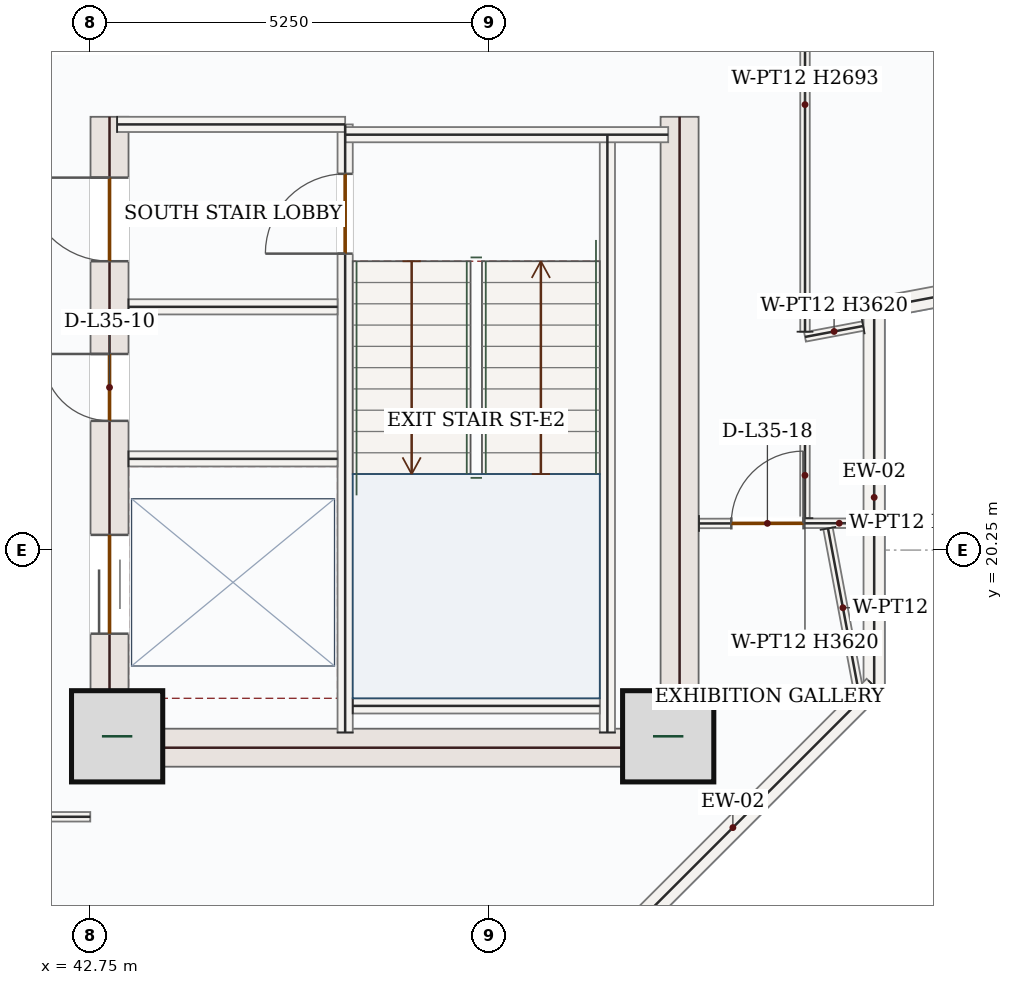
"""IFC4 building model, lengths in metres.
Left out: names, types, materials, properties, quantities, classifications, styles, units other than length and angle.
Written with IfcOpenShell. Run it as: python <this file> out.ifc"""

import sys

from ifc_helpers import new_model, si_unit, direction, frame, frame_2d, origin, origin_2d, place, context, subcontext, project, spatial, rectangle, extrude, source, transform, mapped, element, fill, save


model = new_model("IFC4")
c1 = context("Model", 3, precision=1e-05, world=origin(), true_north=direction((0.0, 1.0)))
c2 = subcontext(c1, "Body", "Model", "MODEL_VIEW")
j1 = project(units=[si_unit("LENGTHUNIT", "METRE"), si_unit("PLANEANGLEUNIT", "RADIAN")], contexts=[c1])
p1 = place(None, origin())
s1 = spatial("IfcSite", under=j1, at=p1, CompositionType="ELEMENT")
p2 = place(p1, origin())
s2 = spatial("IfcBuilding", under=s1, at=p2, CompositionType="ELEMENT")
p3 = place(p2, frame((0.0, 0.0, 155.1)))
s3 = spatial("IfcBuildingStorey", under=s2, at=p3, CompositionType="ELEMENT", Elevation=155.1)
p4 = place(p3, frame((43.0, 17.4, 0.0), z_axis=(0.0, 0.0, 1.0), x_axis=(0.0, 1.0, 0.0)))
e1 = element("IfcWall", 1, at=p4, inside=s3, PredefinedType="SHEAR", context=c2, shape_type="SweptSolid", body=[
    extrude(rectangle(XDim=8.55, YDim=0.5, at=frame_2d((4.275, 0.0))), origin(), (0.0, 0.0, 1.0), 3.62),
])
p5 = place(p4, frame((6.65, 0.0, 0.0)))
e2 = element("IfcOpeningElement", 2, at=p5, cuts=e1, PredefinedType="OPENING", context=c2, shape_type="SweptSolid", body=[
    extrude(rectangle(XDim=1.1, YDim=2.2, at=frame_2d((0.55, 1.1))), frame((0.0, 0.26, 0.0), z_axis=(0.0, -1.0, 0.0), x_axis=(1.0, 0.0, 0.0)), (0.0, 0.0, 1.0), 0.52),
])
p6 = place(p4, frame((1.75, 0.0, 0.0)))
e3 = element("IfcOpeningElement", 3, at=p6, cuts=e1, PredefinedType="OPENING", context=c2, shape_type="SweptSolid", body=[
    extrude(rectangle(XDim=1.3, YDim=2.2, at=frame_2d((0.65, 1.1))), frame((0.0, 0.26, 0.0), z_axis=(0.0, -1.0, 0.0), x_axis=(1.0, 0.0, 0.0)), (0.0, 0.0, 1.0), 0.52),
])
p7 = place(p4, frame((4.55, 0.0, 0.0)))
e4 = element("IfcOpeningElement", 4, at=p7, cuts=e1, PredefinedType="OPENING", context=c2, shape_type="SweptSolid", body=[
    extrude(rectangle(XDim=0.88, YDim=2.1, at=frame_2d((0.44, 1.05))), frame((0.0, 0.26, 0.0), z_axis=(0.0, -1.0, 0.0), x_axis=(1.0, 0.0, 0.0)), (0.0, 0.0, 1.0), 0.52),
])
m1 = source(origin(), c2, "Body", "SweptSolid", [
    extrude(rectangle(XDim=8.55, YDim=0.5, at=frame_2d((4.275, 0.0))), origin(), (0.0, 0.0, 1.0), 3.62),
])
p8 = place(p3, frame((50.5, 17.4, 0.0), z_axis=(0.0, 0.0, 1.0), x_axis=(0.0, 1.0, 0.0)))
e5 = element("IfcWall", 5, at=p8, inside=s3, PredefinedType="SHEAR", context=c2, shape_type="MappedRepresentation", body=[
    mapped(m1, transform((0.0, 0.0, 0.0), x_axis=(1.0, 0.0, 0.0), y_axis=(0.0, 1.0, 0.0), z_axis=(0.0, 0.0, 1.0), scale=1.0)),
])
m2 = source(origin(), c2, "Body", "SweptSolid", [
    extrude(rectangle(XDim=7.0, YDim=0.5, at=frame_2d((3.5, 0.0))), origin(), (0.0, 0.0, 1.0), 3.62),
])
p9 = place(p3, frame((43.25, 17.65, 0.0), z_axis=(0.0, 0.0, 1.0), x_axis=(1.0, 0.0, 0.0)))
e6 = element("IfcWall", 6, at=p9, inside=s3, PredefinedType="SHEAR", context=c2, shape_type="MappedRepresentation", body=[
    mapped(m2, transform((0.0, 0.0, 0.0), x_axis=(1.0, 0.0, 0.0), y_axis=(0.0, 1.0, 0.0), z_axis=(0.0, 0.0, 1.0), scale=1.0)),
])
m3 = source(origin(), c2, "Body", "SweptSolid", [
    extrude(rectangle(XDim=1.2, YDim=1.2, at=origin_2d()), origin(), (0.0, 0.0, 1.0), 3.9),
])
for number, where, z_axis, x_axis in (
    (7, (43.1, 17.8, 0.0), (0.0, 0.0, 1.0), (1.0, 0.0, 0.0)),
    (8, (50.35, 17.8, 0.0), (0.0, 0.0, 1.0), (1.0, 0.0, 0.0)),
):
    element("IfcColumn", number, at=place(p3, frame(where, z_axis=z_axis, x_axis=x_axis)), inside=s3, PredefinedType="COLUMN", context=c2, shape_type="MappedRepresentation", body=[
        mapped(m3, transform((0.0, 0.0, 0.0), x_axis=(1.0, 0.0, 0.0), y_axis=(0.0, 1.0, 0.0), z_axis=(0.0, 0.0, 1.0), scale=1.0)),
    ])
p10 = place(p3, frame((61.957, 25.1, 0.0), z_axis=(0.0, 0.0, 1.0), x_axis=(-0.982808012228, -0.184630471755, 0.0)))
e9 = element("IfcWall", 9, at=p10, inside=s3, PredefinedType="SOLIDWALL", context=c2, shape_type="SweptSolid", body=[
    extrude(rectangle(XDim=9.052, YDim=0.28, at=frame_2d((4.526, 0.0))), origin(), (0.0, 0.0, 1.0), 3.62),
])
p11 = place(p10, frame((3.626, 0.0, 0.85)))
e10 = element("IfcOpeningElement", 10, at=p11, cuts=e9, PredefinedType="OPENING", context=c2, shape_type="SweptSolid", body=[
    extrude(rectangle(XDim=1.8, YDim=1.75, at=frame_2d((0.9, 0.875))), frame((0.0, 0.15, 0.0), z_axis=(0.0, -1.0, 0.0), x_axis=(1.0, 0.0, 0.0)), (0.0, 0.0, 1.0), 0.3),
])
m4 = source(origin(), c2, "Body", "SweptSolid", [
    extrude(rectangle(XDim=4.97, YDim=0.28, at=frame_2d((2.485, 0.0))), origin(), (0.0, 0.0, 1.0), 3.62),
])
p12 = place(p3, frame((53.06, 23.428, 0.0), z_axis=(0.0, 0.0, 1.0), x_axis=(0.0, -1.0, 0.0)))
e11 = element("IfcWall", 11, at=p12, inside=s3, PredefinedType="SOLIDWALL", context=c2, shape_type="MappedRepresentation", body=[
    mapped(m4, transform((0.0, 0.0, 0.0), x_axis=(1.0, 0.0, 0.0), y_axis=(0.0, 1.0, 0.0), z_axis=(0.0, 0.0, 1.0), scale=1.0)),
])
m5 = source(origin(), c2, "Body", "SweptSolid", [
    extrude(rectangle(XDim=5.258, YDim=0.28, at=frame_2d((2.629, 0.0))), origin(), (0.0, 0.0, 1.0), 3.62),
])
p13 = place(p3, frame((53.06, 18.458, 0.0), z_axis=(0.0, 0.0, 1.0), x_axis=(-0.707106781187, -0.707106781187, 0.0)))
e12 = element("IfcWall", 12, at=p13, inside=s3, PredefinedType="SOLIDWALL", context=c2, shape_type="MappedRepresentation", body=[
    mapped(m5, transform((0.0, 0.0, 0.0), x_axis=(1.0, 0.0, 0.0), y_axis=(0.0, 1.0, 0.0), z_axis=(0.0, 0.0, 1.0), scale=1.0)),
])
m6 = source(origin(), c2, "Body", "SweptSolid", [
    extrude(rectangle(XDim=7.87, YDim=0.2, at=frame_2d((3.935, 0.0))), origin(), (0.0, 0.0, 1.0), 3.62),
])
p14 = place(p3, frame((49.55, 17.85, 0.0), z_axis=(0.0, 0.0, 1.0), x_axis=(0.0, 1.0, 0.0)))
e13 = element("IfcWall", 13, at=p14, inside=s3, PredefinedType="SOLIDWALL", context=c2, shape_type="MappedRepresentation", body=[
    mapped(m6, transform((0.0, 0.0, 0.0), x_axis=(1.0, 0.0, 0.0), y_axis=(0.0, 1.0, 0.0), z_axis=(0.0, 0.0, 1.0), scale=1.0)),
])
p15 = place(p3, frame((46.1, 17.85, 0.0), z_axis=(0.0, 0.0, 1.0), x_axis=(0.0, 1.0, 0.0)))
e14 = element("IfcWall", 14, at=p15, inside=s3, PredefinedType="SOLIDWALL", context=c2, shape_type="SweptSolid", body=[
    extrude(rectangle(XDim=8.0, YDim=0.2, at=frame_2d((4.0, 0.0))), origin(), (0.0, 0.0, 1.0), 3.62),
])
p16 = place(p15, frame((6.3, 0.0, 0.0)))
e15 = element("IfcOpeningElement", 15, at=p16, cuts=e14, PredefinedType="OPENING", context=c2, shape_type="SweptSolid", body=[
    extrude(rectangle(XDim=1.05, YDim=2.15, at=frame_2d((0.525, 1.075))), frame((0.0, 0.11, 0.0), z_axis=(0.0, -1.0, 0.0), x_axis=(1.0, 0.0, 0.0)), (0.0, 0.0, 1.0), 0.22),
])
m7 = source(origin(), c2, "Body", "SweptSolid", [
    extrude(rectangle(XDim=3.0, YDim=0.2, at=frame_2d((1.5, 0.0))), origin(), (0.0, 0.0, 1.0), 3.62),
])
p17 = place(p3, frame((43.1, 25.85, 0.0), z_axis=(0.0, 0.0, 1.0), x_axis=(1.0, 0.0, 0.0)))
e16 = element("IfcWall", 16, at=p17, inside=s3, PredefinedType="SOLIDWALL", context=c2, shape_type="MappedRepresentation", body=[
    mapped(m7, transform((0.0, 0.0, 0.0), x_axis=(1.0, 0.0, 0.0), y_axis=(0.0, 1.0, 0.0), z_axis=(0.0, 0.0, 1.0), scale=1.0)),
])
m8 = source(origin(), c2, "Body", "SweptSolid", [
    extrude(rectangle(XDim=4.25, YDim=0.2, at=frame_2d((2.125, 0.0))), origin(), (0.0, 0.0, 1.0), 3.62),
])
p18 = place(p3, frame((46.1, 25.715, 0.0), z_axis=(0.0, 0.0, 1.0), x_axis=(1.0, 0.0, 0.0)))
e17 = element("IfcWall", 17, at=p18, inside=s3, PredefinedType="SOLIDWALL", context=c2, shape_type="MappedRepresentation", body=[
    mapped(m8, transform((0.0, 0.0, 0.0), x_axis=(1.0, 0.0, 0.0), y_axis=(0.0, 1.0, 0.0), z_axis=(0.0, 0.0, 1.0), scale=1.0)),
])
m9 = source(origin(), c2, "Body", "SweptSolid", [
    extrude(rectangle(XDim=3.25, YDim=0.2, at=frame_2d((1.625, 0.0))), origin(), (0.0, 0.0, 1.0), 3.62),
])
p19 = place(p3, frame((46.2, 18.2, 0.0), z_axis=(0.0, 0.0, 1.0), x_axis=(1.0, 0.0, 0.0)))
e18 = element("IfcWall", 18, at=p19, inside=s3, PredefinedType="SOLIDWALL", context=c2, shape_type="MappedRepresentation", body=[
    mapped(m9, transform((0.0, 0.0, 0.0), x_axis=(1.0, 0.0, 0.0), y_axis=(0.0, 1.0, 0.0), z_axis=(0.0, 0.0, 1.0), scale=1.0)),
])
m10 = source(origin(), c2, "Body", "SweptSolid", [
    extrude(rectangle(XDim=2.75, YDim=0.2, at=frame_2d((1.375, 0.0))), origin(), (0.0, 0.0, 1.0), 3.62),
])
for number, where, z_axis, x_axis in (
    (19, (43.25, 23.45, 0.0), (0.0, 0.0, 1.0), (1.0, 0.0, 0.0)),
    (20, (43.25, 21.45, 0.0), (0.0, 0.0, 1.0), (1.0, 0.0, 0.0)),
):
    element("IfcWall", number, at=place(p3, frame(where, z_axis=z_axis, x_axis=x_axis)), inside=s3, PredefinedType="SOLIDWALL", context=c2, shape_type="MappedRepresentation", body=[
        mapped(m10, transform((0.0, 0.0, 0.0), x_axis=(1.0, 0.0, 0.0), y_axis=(0.0, 1.0, 0.0), z_axis=(0.0, 0.0, 1.0), scale=1.0)),
    ])
p20 = place(p3, frame((50.755, 20.6, 0.0), z_axis=(0.0, 0.0, 1.0), x_axis=(0.99999875384, 0.001578708001, 0.0)))
e21 = element("IfcWall", 21, at=p20, inside=s3, PredefinedType="PARTITIONING", context=c2, shape_type="SweptSolid", body=[
    extrude(rectangle(XDim=2.165, YDim=0.125, at=frame_2d((1.083, 0.0))), origin(), (0.0, 0.0, 1.0), 3.62),
])
p21 = place(p20, frame((0.425, 0.0, 0.0)))
e22 = element("IfcOpeningElement", 22, at=p21, cuts=e21, PredefinedType="OPENING", context=c2, shape_type="SweptSolid", body=[
    extrude(rectangle(XDim=0.95, YDim=2.15, at=frame_2d((0.475, 1.075))), frame((0.0, 0.073, 0.0), z_axis=(0.0, -1.0, 0.0), x_axis=(1.0, 0.0, 0.0)), (0.0, 0.0, 1.0), 0.145),
])
m11 = source(origin(), c2, "Body", "SweptSolid", [
    extrude(rectangle(XDim=1.127, YDim=0.125, at=frame_2d((0.563, 0.0))), origin(), (0.0, 0.0, 1.0), 3.62),
])
p22 = place(p3, frame((52.149, 20.67, 0.0), z_axis=(0.0, 0.0, 1.0), x_axis=(0.001083188273, 0.999999413351, 0.0)))
e23 = element("IfcWall", 23, at=p22, inside=s3, PredefinedType="PARTITIONING", context=c2, shape_type="MappedRepresentation", body=[
    mapped(m11, transform((0.0, 0.0, 0.0), x_axis=(1.0, 0.0, 0.0), y_axis=(0.0, 1.0, 0.0), z_axis=(0.0, 0.0, 1.0), scale=1.0)),
])
m12 = source(origin(), c2, "Body", "SweptSolid", [
    extrude(rectangle(XDim=2.124, YDim=0.125, at=frame_2d((1.062, 0.0))), origin(), (0.0, 0.0, 1.0), 3.62),
])
p23 = place(p3, frame((52.452, 20.535, 0.0), z_axis=(0.0, 0.0, 1.0), x_axis=(0.184697942122, -0.982795334836, 0.0)))
e24 = element("IfcWall", 24, at=p23, inside=s3, PredefinedType="PARTITIONING", context=c2, shape_type="MappedRepresentation", body=[
    mapped(m12, transform((0.0, 0.0, 0.0), x_axis=(1.0, 0.0, 0.0), y_axis=(0.0, 1.0, 0.0), z_axis=(0.0, 0.0, 1.0), scale=1.0)),
])
m13 = source(origin(), c2, "Body", "SweptSolid", [
    extrude(rectangle(XDim=0.779, YDim=0.125, at=frame_2d((0.389, 0.0))), origin(), (0.0, 0.0, 1.0), 3.62),
])
p24 = place(p3, frame((52.915, 23.198, 0.0), z_axis=(0.0, 0.0, 1.0), x_axis=(-0.982850878619, -0.184402143149, 0.0)))
e25 = element("IfcWall", 25, at=p24, inside=s3, PredefinedType="PARTITIONING", context=c2, shape_type="MappedRepresentation", body=[
    mapped(m13, transform((0.0, 0.0, 0.0), x_axis=(1.0, 0.0, 0.0), y_axis=(0.0, 1.0, 0.0), z_axis=(0.0, 0.0, 1.0), scale=1.0)),
])
m14 = source(origin(), c2, "Body", "SweptSolid", [
    extrude(rectangle(XDim=5.975, YDim=0.125, at=frame_2d((2.988, 0.0))), origin(), (0.0, 0.0, 1.0), 2.693),
])
p25 = place(p3, frame((52.15, 23.123, 0.0), z_axis=(0.0, 0.0, 1.0), x_axis=(0.0, 1.0, 0.0)))
e26 = element("IfcWall", 26, at=p25, inside=s3, PredefinedType="PARTITIONING", context=c2, shape_type="MappedRepresentation", body=[
    mapped(m14, transform((0.0, 0.0, 0.0), x_axis=(1.0, 0.0, 0.0), y_axis=(0.0, 1.0, 0.0), z_axis=(0.0, 0.0, 1.0), scale=1.0)),
])
m15 = source(origin(), c2, "Body", "SweptSolid", [
    extrude(rectangle(XDim=3.814, YDim=0.125, at=frame_2d((1.907, 0.0))), origin(), (0.0, 0.0, 1.0), 3.079),
])
p26 = place(p3, frame((38.932, 16.74, 0.0), z_axis=(0.0, 0.0, 1.0), x_axis=(0.999999948787, 0.000320040949, 0.0)))
e27 = element("IfcWall", 27, at=p26, inside=s3, PredefinedType="PARTITIONING", context=c2, shape_type="MappedRepresentation", body=[
    mapped(m15, transform((0.0, 0.0, 0.0), x_axis=(1.0, 0.0, 0.0), y_axis=(0.0, 1.0, 0.0), z_axis=(0.0, 0.0, 1.0), scale=1.0)),
])
m16 = source(origin(), c2, "Body", "SweptSolid", [
    extrude(rectangle(XDim=1.05, YDim=2.15, at=frame_2d((0.525, 1.075))), frame((0.0, 0.025, 0.0), z_axis=(0.0, -1.0, 0.0), x_axis=(1.0, 0.0, 0.0)), (0.0, 0.0, 1.0), 0.05),
])
p27 = place(p16, origin())
e28 = element("IfcDoor", 28, at=p27, inside=s3, OperationType="SINGLE_SWING_LEFT", PredefinedType="DOOR", context=c2, shape_type="MappedRepresentation", body=[
    mapped(m16, transform((0.0, 0.0, 0.0), x_axis=(1.0, 0.0, 0.0), y_axis=(0.0, 1.0, 0.0), z_axis=(0.0, 0.0, 1.0), scale=1.0)),
])
fill(e15, e28)
m17 = source(origin(), c2, "Body", "SweptSolid", [
    extrude(rectangle(XDim=1.1, YDim=2.2, at=frame_2d((0.55, 1.1))), frame((0.0, 0.025, 0.0), z_axis=(0.0, -1.0, 0.0), x_axis=(1.0, 0.0, 0.0)), (0.0, 0.0, 1.0), 0.05),
])
p28 = place(p5, origin())
e29 = element("IfcDoor", 29, at=p28, inside=s3, OperationType="SINGLE_SWING_RIGHT", PredefinedType="DOOR", context=c2, shape_type="MappedRepresentation", body=[
    mapped(m17, transform((0.0, 0.0, 0.0), x_axis=(1.0, 0.0, 0.0), y_axis=(0.0, 1.0, 0.0), z_axis=(0.0, 0.0, 1.0), scale=1.0)),
])
fill(e2, e29)
m18 = source(origin(), c2, "Body", "SweptSolid", [
    extrude(rectangle(XDim=1.3, YDim=2.2, at=frame_2d((0.65, 1.1))), frame((0.0, 0.025, 0.0), z_axis=(0.0, -1.0, 0.0), x_axis=(1.0, 0.0, 0.0)), (0.0, 0.0, 1.0), 0.05),
])
p29 = place(p6, origin())
e30 = element("IfcDoor", 30, at=p29, inside=s3, OperationType="DOUBLE_DOOR_SLIDING", PredefinedType="DOOR", context=c2, shape_type="MappedRepresentation", body=[
    mapped(m18, transform((0.0, 0.0, 0.0), x_axis=(1.0, 0.0, 0.0), y_axis=(0.0, 1.0, 0.0), z_axis=(0.0, 0.0, 1.0), scale=1.0)),
])
fill(e3, e30)
m19 = source(origin(), c2, "Body", "SweptSolid", [
    extrude(rectangle(XDim=0.88, YDim=2.1, at=frame_2d((0.44, 1.05))), frame((0.0, 0.025, 0.0), z_axis=(0.0, -1.0, 0.0), x_axis=(1.0, 0.0, 0.0)), (0.0, 0.0, 1.0), 0.05),
])
p30 = place(p7, origin())
e31 = element("IfcDoor", 31, at=p30, inside=s3, OperationType="SINGLE_SWING_RIGHT", PredefinedType="DOOR", context=c2, shape_type="MappedRepresentation", body=[
    mapped(m19, transform((0.0, 0.0, 0.0), x_axis=(1.0, 0.0, 0.0), y_axis=(0.0, 1.0, 0.0), z_axis=(0.0, 0.0, 1.0), scale=1.0)),
])
fill(e4, e31)
m20 = source(origin(), c2, "Body", "SweptSolid", [
    extrude(rectangle(XDim=0.95, YDim=2.15, at=frame_2d((0.475, 1.075))), frame((0.0, 0.025, 0.0), z_axis=(0.0, -1.0, 0.0), x_axis=(1.0, 0.0, 0.0)), (0.0, 0.0, 1.0), 0.05),
])
p31 = place(p21, origin())
e32 = element("IfcDoor", 32, at=p31, inside=s3, OperationType="SINGLE_SWING_RIGHT", PredefinedType="DOOR", context=c2, shape_type="MappedRepresentation", body=[
    mapped(m20, transform((0.0, 0.0, 0.0), x_axis=(1.0, 0.0, 0.0), y_axis=(0.0, 1.0, 0.0), z_axis=(0.0, 0.0, 1.0), scale=1.0)),
])
fill(e22, e32)
save(model, sys.argv[1])
